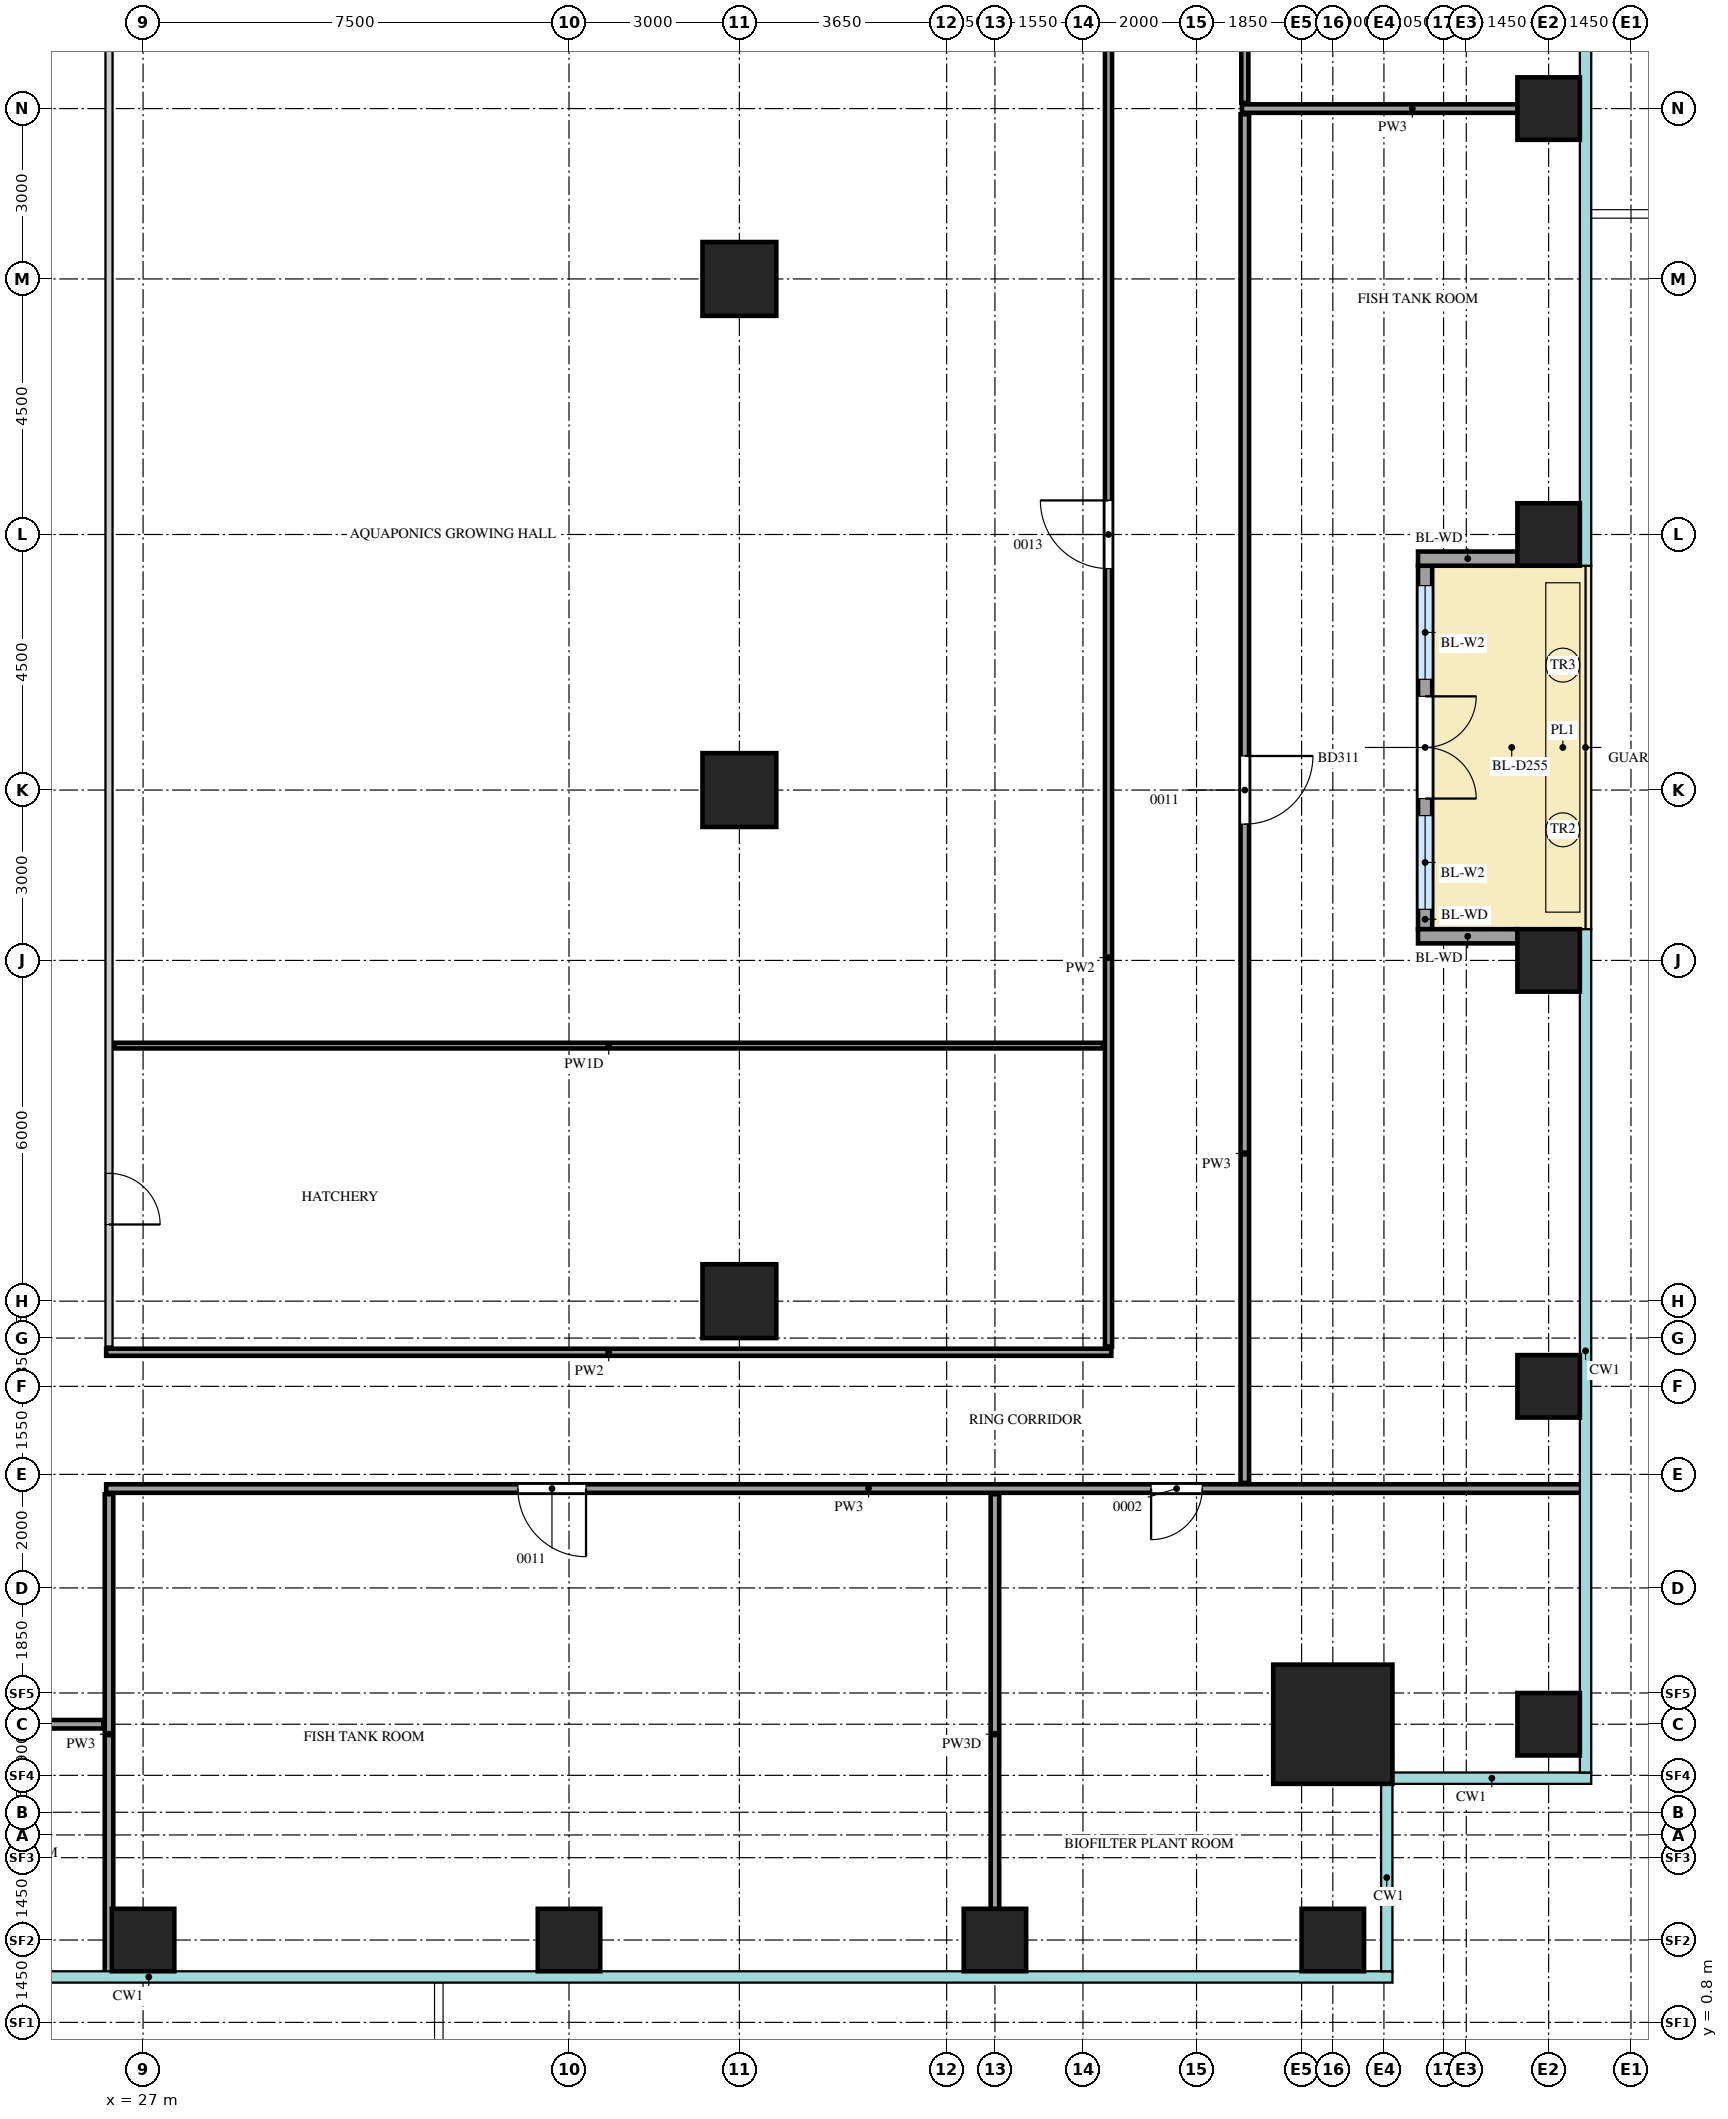
"""IFC4 building model, lengths in metres.
Left out: names, types, materials, properties, quantities, classifications, styles, units other than length and angle.
Written with IfcOpenShell. Run it as: python <this file> out.ifc"""

import sys

from ifc_helpers import new_model, si_unit, direction, frame, frame_2d, origin, origin_2d, place, context, subcontext, project, spatial, rectangle, extrude, source, transform, mapped, element, fill, save


model = new_model("IFC4")
c1 = context("Model", 3, precision=1e-05, world=origin(), true_north=direction((0.0, 1.0)))
c2 = subcontext(c1, "Body", "Model", "MODEL_VIEW")
j1 = project(units=[si_unit("LENGTHUNIT", "METRE"), si_unit("PLANEANGLEUNIT", "RADIAN")], contexts=[c1])
p1 = place(None, origin())
s1 = spatial("IfcSite", under=j1, at=p1, CompositionType="ELEMENT")
p2 = place(p1, origin())
s2 = spatial("IfcBuilding", under=s1, at=p2, CompositionType="ELEMENT")
p3 = place(p2, frame((0.0, 0.0, 145.5)))
s3 = spatial("IfcBuildingStorey", under=s2, at=p3, CompositionType="ELEMENT", Elevation=145.5)
m1 = source(origin(), c2, "Body", "SweptSolid", [
    extrude(rectangle(XDim=2.1, YDim=2.1, at=origin_2d()), origin(), (0.0, 0.0, 1.0), 4.4),
])
p4 = place(p3, frame((47.95, 6.05, 0.0), z_axis=(0.0, 0.0, 1.0), x_axis=(1.0, 0.0, 0.0)))
e1 = element("IfcColumn", 1, at=p4, inside=s3, PredefinedType="COLUMN", context=c2, shape_type="MappedRepresentation", body=[
    mapped(m1, transform((0.0, 0.0, 0.0))),
])
m2 = source(origin(), c2, "Body", "SweptSolid", [
    extrude(rectangle(XDim=1.1, YDim=1.1, at=origin_2d()), origin(), (0.0, 0.0, 1.0), 4.1),
])
for number, where, z_axis, x_axis in (
    (2, (27.0, 2.25, 0.0), (0.0, 0.0, 1.0), (1.0, 0.0, 0.0)),
    (3, (34.5, 2.25, 0.0), (0.0, 0.0, 1.0), (1.0, 0.0, 0.0)),
    (4, (42.0, 2.25, 0.0), (0.0, 0.0, 1.0), (1.0, 0.0, 0.0)),
    (5, (47.95, 2.25, 0.0), (0.0, 0.0, 1.0), (1.0, 0.0, 0.0)),
    (6, (51.75, 6.05, 0.0), (0.0, 0.0, 1.0), (1.0, 0.0, 0.0)),
    (7, (51.75, 12.0, 0.0), (0.0, 0.0, 1.0), (1.0, 0.0, 0.0)),
    (8, (51.75, 19.5, 0.0), (0.0, 0.0, 1.0), (1.0, 0.0, 0.0)),
    (9, (51.75, 27.0, 0.0), (0.0, 0.0, 1.0), (1.0, 0.0, 0.0)),
    (10, (51.75, 34.5, 0.0), (0.0, 0.0, 1.0), (1.0, 0.0, 0.0)),
):
    element("IfcColumn", number, at=place(p3, frame(where, z_axis=z_axis, x_axis=x_axis)), inside=s3, PredefinedType="COLUMN", context=c2, shape_type="MappedRepresentation", body=[
        mapped(m2, transform((0.0, 0.0, 0.0))),
    ])
m3 = source(origin(), c2, "Body", "SweptSolid", [
    extrude(rectangle(XDim=1.3, YDim=1.3, at=origin_2d()), origin(), (0.0, 0.0, 1.0), 4.1),
])
for number, where, z_axis, x_axis in (
    (11, (37.5, 13.5, 0.0), (0.0, 0.0, 1.0), (1.0, 0.0, 0.0)),
    (12, (37.5, 22.5, 0.0), (0.0, 0.0, 1.0), (1.0, 0.0, 0.0)),
    (13, (37.5, 31.5, 0.0), (0.0, 0.0, 1.0), (1.0, 0.0, 0.0)),
):
    element("IfcColumn", number, at=place(p3, frame(where, z_axis=z_axis, x_axis=x_axis)), inside=s3, PredefinedType="COLUMN", context=c2, shape_type="MappedRepresentation", body=[
        mapped(m3, transform((0.0, 0.0, 0.0))),
    ])
m4 = source(origin(), c2, "Body", "SweptSolid", [
    extrude(rectangle(XDim=6.4, YDim=0.25, at=frame_2d((3.2, 0.0))), origin(), (0.0, 0.0, 1.0), 3.55),
])
p5 = place(p3, frame((49.575, 20.05, 0.0), z_axis=(0.0, 0.0, 1.0), x_axis=(0.0, 1.0, 0.0)))
e14 = element("IfcWall", 14, at=p5, inside=s3, PredefinedType="SOLIDWALL", context=c2, shape_type="MappedRepresentation", body=[
    mapped(m4, transform((0.0, 0.0, 0.0))),
])
m5 = source(origin(), c2, "Body", "SweptSolid", [
    extrude(rectangle(XDim=1.65, YDim=2.4, at=frame_2d((0.825, 1.2))), frame((0.0, 0.135, 0.0), z_axis=(0.0, -1.0, 0.0), x_axis=(1.0, 0.0, 0.0)), (0.0, 0.0, 1.0), 0.27),
])
p6 = place(p5, frame((0.35, 0.0, 0.0)))
e15 = element("IfcOpeningElement", 15, at=p6, cuts=e14, PredefinedType="OPENING", context=c2, shape_type="MappedRepresentation", body=[
    mapped(m5, transform((0.0, 0.0, 0.0))),
])
p7 = place(p5, frame((4.4, 0.0, 0.0)))
e16 = element("IfcOpeningElement", 16, at=p7, cuts=e14, PredefinedType="OPENING", context=c2, shape_type="MappedRepresentation", body=[
    mapped(m5, transform((0.0, 0.0, 0.0))),
])
m6 = source(origin(), c2, "Body", "SweptSolid", [
    extrude(rectangle(XDim=1.8, YDim=2.4, at=frame_2d((0.9, 1.2))), frame((0.0, 0.135, 0.0), z_axis=(0.0, -1.0, 0.0), x_axis=(1.0, 0.0, 0.0)), (0.0, 0.0, 1.0), 0.27),
])
p8 = place(p5, frame((2.3, 0.0, 0.0)))
e17 = element("IfcOpeningElement", 17, at=p8, cuts=e14, PredefinedType="OPENING", context=c2, shape_type="MappedRepresentation", body=[
    mapped(m6, transform((0.0, 0.0, 0.0))),
])
m7 = source(origin(), c2, "Body", "SweptSolid", [
    extrude(rectangle(XDim=1.75, YDim=0.25, at=frame_2d((0.875, 0.0))), origin(), (0.0, 0.0, 1.0), 3.55),
])
for number, where, z_axis, x_axis in (
    (18, (51.2, 19.925, 0.0), (0.0, 0.0, 1.0), (-1.0, 0.0, 0.0)),
    (19, (51.2, 26.575, 0.0), (0.0, 0.0, 1.0), (-1.0, 0.0, 0.0)),
):
    element("IfcWall", number, at=place(p3, frame(where, z_axis=z_axis, x_axis=x_axis)), inside=s3, PredefinedType="SOLIDWALL", context=c2, shape_type="MappedRepresentation", body=[
        mapped(m7, transform((0.0, 0.0, 0.0))),
    ])
m8 = source(origin(), c2, "Body", "SweptSolid", [
    extrude(rectangle(XDim=8.45, YDim=0.15, at=frame_2d((4.225, 0.0))), origin(), (0.0, 0.0, 1.0), 4.2),
])
p9 = place(p3, frame((26.4, 1.65, 0.0), z_axis=(0.0, 0.0, 1.0), x_axis=(0.0, 1.0, 0.0)))
e20 = element("IfcWall", 20, at=p9, inside=s3, PredefinedType="PARTITIONING", context=c2, shape_type="MappedRepresentation", body=[
    mapped(m8, transform((0.0, 0.0, 0.0))),
])
m9 = source(origin(), c2, "Body", "SweptSolid", [
    extrude(rectangle(XDim=8.45, YDim=0.15, at=frame_2d((4.225, 0.0))), origin(), (0.0, 0.0, 1.0), 3.6),
])
p10 = place(p3, frame((42.0, 1.65, 0.0), z_axis=(0.0, 0.0, 1.0), x_axis=(0.0, 1.0, 0.0)))
e21 = element("IfcWall", 21, at=p10, inside=s3, PredefinedType="PARTITIONING", context=c2, shape_type="MappedRepresentation", body=[
    mapped(m9, transform((0.0, 0.0, 0.0))),
])
m10 = source(origin(), c2, "Body", "SweptSolid", [
    extrude(rectangle(XDim=14.35, YDim=0.15, at=frame_2d((7.175, 0.0))), origin(), (0.0, 0.0, 1.0), 4.2),
])
p11 = place(p3, frame((11.95, 6.05, 0.0), z_axis=(0.0, 0.0, 1.0), x_axis=(1.0, 0.0, 0.0)))
e22 = element("IfcWall", 22, at=p11, inside=s3, PredefinedType="PARTITIONING", context=c2, shape_type="MappedRepresentation", body=[
    mapped(m10, transform((0.0, 0.0, 0.0))),
])
m11 = source(origin(), c2, "Body", "SweptSolid", [
    extrude(rectangle(XDim=0.9, YDim=2.1, at=frame_2d((0.45, 1.05))), frame((0.0, 0.085, 0.0), z_axis=(0.0, -1.0, 0.0), x_axis=(1.0, 0.0, 0.0)), (0.0, 0.0, 1.0), 0.17),
])
p12 = place(p11, frame((6.8, 0.0, 0.0)))
e23 = element("IfcOpeningElement", 23, at=p12, cuts=e22, PredefinedType="OPENING", context=c2, shape_type="MappedRepresentation", body=[
    mapped(m11, transform((0.0, 0.0, 0.0))),
])
m12 = source(origin(), c2, "Body", "SweptSolid", [
    extrude(rectangle(XDim=26.0, YDim=0.15, at=frame_2d((13.0, 0.0))), origin(), (0.0, 0.0, 1.0), 4.2),
])
p13 = place(p3, frame((26.35, 10.2, 0.0), z_axis=(0.0, 0.0, 1.0), x_axis=(1.0, 0.0, 0.0)))
e24 = element("IfcWall", 24, at=p13, inside=s3, PredefinedType="PARTITIONING", context=c2, shape_type="MappedRepresentation", body=[
    mapped(m12, transform((0.0, 0.0, 0.0))),
])
m13 = source(origin(), c2, "Body", "SweptSolid", [
    extrude(rectangle(XDim=1.2, YDim=2.1, at=frame_2d((0.6, 1.05))), frame((0.0, 0.085, 0.0), z_axis=(0.0, -1.0, 0.0), x_axis=(1.0, 0.0, 0.0)), (0.0, 0.0, 1.0), 0.17),
])
p14 = place(p13, frame((7.25, 0.0, 0.0)))
e25 = element("IfcOpeningElement", 25, at=p14, cuts=e24, PredefinedType="OPENING", context=c2, shape_type="MappedRepresentation", body=[
    mapped(m13, transform((0.0, 0.0, 0.0))),
])
p15 = place(p13, frame((18.4, 0.0, 0.0)))
e26 = element("IfcOpeningElement", 26, at=p15, cuts=e24, PredefinedType="OPENING", context=c2, shape_type="MappedRepresentation", body=[
    mapped(m11, transform((0.0, 0.0, 0.0))),
])
m14 = source(origin(), c2, "Body", "SweptSolid", [
    extrude(rectangle(XDim=24.1, YDim=0.15, at=frame_2d((12.05, 0.0))), origin(), (0.0, 0.0, 1.0), 4.2),
])
p16 = place(p3, frame((46.4, 10.3, 0.0), z_axis=(0.0, 0.0, 1.0), x_axis=(0.0, 1.0, 0.0)))
e27 = element("IfcWall", 27, at=p16, inside=s3, PredefinedType="PARTITIONING", context=c2, shape_type="MappedRepresentation", body=[
    mapped(m14, transform((0.0, 0.0, 0.0))),
])
p17 = place(p16, frame((11.6, 0.0, 0.0)))
e28 = element("IfcOpeningElement", 28, at=p17, cuts=e27, PredefinedType="OPENING", context=c2, shape_type="MappedRepresentation", body=[
    mapped(m13, transform((0.0, 0.0, 0.0))),
])
m15 = source(origin(), c2, "Body", "SweptSolid", [
    extrude(rectangle(XDim=17.7, YDim=0.125, at=frame_2d((8.85, 0.0))), origin(), (0.0, 0.0, 1.0), 4.2),
])
p18 = place(p3, frame((26.35, 12.6, 0.0), z_axis=(0.0, 0.0, 1.0), x_axis=(1.0, 0.0, 0.0)))
e29 = element("IfcWall", 29, at=p18, inside=s3, PredefinedType="PARTITIONING", context=c2, shape_type="MappedRepresentation", body=[
    mapped(m15, transform((0.0, 0.0, 0.0))),
])
m16 = source(origin(), c2, "Body", "SweptSolid", [
    extrude(rectangle(XDim=23.2, YDim=0.125, at=frame_2d((11.6, 0.0))), origin(), (0.0, 0.0, 1.0), 4.2),
])
p19 = place(p3, frame((26.4, 12.7, 0.0), z_axis=(0.0, 0.0, 1.0), x_axis=(0.0, 1.0, 0.0)))
e30 = element("IfcWall", 30, at=p19, inside=s3, PredefinedType="PARTITIONING", context=c2, shape_type="MappedRepresentation", body=[
    mapped(m16, transform((0.0, 0.0, 0.0))),
])
m17 = source(origin(), c2, "Body", "SweptSolid", [
    extrude(rectangle(XDim=0.9, YDim=2.1, at=frame_2d((0.45, 1.05))), frame((0.0, 0.073, 0.0), z_axis=(0.0, -1.0, 0.0), x_axis=(1.0, 0.0, 0.0)), (0.0, 0.0, 1.0), 0.145),
])
p20 = place(p19, frame((2.15, 0.0, 0.0)))
e31 = element("IfcOpeningElement", 31, at=p20, cuts=e30, PredefinedType="OPENING", context=c2, shape_type="MappedRepresentation", body=[
    mapped(m17, transform((0.0, 0.0, 0.0))),
])
m18 = source(origin(), c2, "Body", "SweptSolid", [
    extrude(rectangle(XDim=32.85, YDim=0.125, at=frame_2d((16.425, 0.0))), origin(), (0.0, 0.0, 1.0), 4.2),
])
p21 = place(p3, frame((44.0, 12.7, 0.0), z_axis=(0.0, 0.0, 1.0), x_axis=(0.0, 1.0, 0.0)))
e32 = element("IfcWall", 32, at=p21, inside=s3, PredefinedType="PARTITIONING", context=c2, shape_type="MappedRepresentation", body=[
    mapped(m18, transform((0.0, 0.0, 0.0))),
])
m19 = source(origin(), c2, "Body", "SweptSolid", [
    extrude(rectangle(XDim=1.2, YDim=2.1, at=frame_2d((0.6, 1.05))), frame((0.0, 0.073, 0.0), z_axis=(0.0, -1.0, 0.0), x_axis=(1.0, 0.0, 0.0)), (0.0, 0.0, 1.0), 0.145),
])
p22 = place(p21, frame((13.7, 0.0, 0.0)))
e33 = element("IfcOpeningElement", 33, at=p22, cuts=e32, PredefinedType="OPENING", context=c2, shape_type="MappedRepresentation", body=[
    mapped(m19, transform((0.0, 0.0, 0.0))),
])
p23 = place(p21, frame((27.5, 0.0, 0.0)))
e34 = element("IfcOpeningElement", 34, at=p23, cuts=e32, PredefinedType="OPENING", context=c2, shape_type="MappedRepresentation", body=[
    mapped(m19, transform((0.0, 0.0, 0.0))),
])
m20 = source(origin(), c2, "Body", "SweptSolid", [
    extrude(rectangle(XDim=17.4, YDim=0.1, at=frame_2d((8.7, 0.0))), origin(), (0.0, 0.0, 1.0), 4.2),
])
p24 = place(p3, frame((26.5, 18.0, 0.0), z_axis=(0.0, 0.0, 1.0), x_axis=(1.0, 0.0, 0.0)))
e35 = element("IfcWall", 35, at=p24, inside=s3, PredefinedType="PARTITIONING", context=c2, shape_type="MappedRepresentation", body=[
    mapped(m20, transform((0.0, 0.0, 0.0))),
])
m21 = source(origin(), c2, "Body", "SweptSolid", [
    extrude(rectangle(XDim=6.0, YDim=0.15, at=frame_2d((3.0, 0.0))), origin(), (0.0, 0.0, 1.0), 4.2),
])
p25 = place(p3, frame((46.35, 34.5, 0.0), z_axis=(0.0, 0.0, 1.0), x_axis=(1.0, 0.0, 0.0)))
e36 = element("IfcWall", 36, at=p25, inside=s3, PredefinedType="PARTITIONING", context=c2, shape_type="MappedRepresentation", body=[
    mapped(m21, transform((0.0, 0.0, 0.0))),
])
m22 = source(origin(), c2, "Body", "SweptSolid", [
    extrude(rectangle(XDim=13.35, YDim=0.125, at=frame_2d((6.675, 0.0))), origin(), (0.0, 0.0, 1.0), 4.2),
])
p26 = place(p3, frame((46.4, 34.6, 0.0), z_axis=(0.0, 0.0, 1.0), x_axis=(0.0, 1.0, 0.0)))
e37 = element("IfcWall", 37, at=p26, inside=s3, PredefinedType="PARTITIONING", context=c2, shape_type="MappedRepresentation", body=[
    mapped(m22, transform((0.0, 0.0, 0.0))),
])
p27 = place(p26, frame((4.9, 0.0, 0.0)))
e38 = element("IfcOpeningElement", 38, at=p27, cuts=e37, PredefinedType="OPENING", context=c2, shape_type="MappedRepresentation", body=[
    mapped(m19, transform((0.0, 0.0, 0.0))),
])
m23 = source(origin(), c2, "Body", "SweptSolid", [
    extrude(rectangle(XDim=1.65, YDim=2.4, at=frame_2d((0.825, 1.2))), frame((0.0, 0.03, 0.0), z_axis=(0.0, -1.0, 0.0), x_axis=(1.0, 0.0, 0.0)), (0.0, 0.0, 1.0), 0.06),
])
p28 = place(p6, origin())
e39 = element("IfcWindow", 39, at=p28, inside=s3, PartitioningType="SINGLE_PANEL", PredefinedType="WINDOW", context=c2, shape_type="MappedRepresentation", body=[
    mapped(m23, transform((0.0, 0.0, 0.0))),
])
fill(e15, e39)
p29 = place(p7, origin())
e40 = element("IfcWindow", 40, at=p29, inside=s3, PartitioningType="SINGLE_PANEL", PredefinedType="WINDOW", context=c2, shape_type="MappedRepresentation", body=[
    mapped(m23, transform((0.0, 0.0, 0.0))),
])
fill(e16, e40)
m24 = source(origin(), c2, "Body", "SweptSolid", [
    extrude(rectangle(XDim=1.8, YDim=2.4, at=frame_2d((0.9, 1.2))), frame((0.0, 0.025, 0.0), z_axis=(0.0, -1.0, 0.0), x_axis=(1.0, 0.0, 0.0)), (0.0, 0.0, 1.0), 0.05),
])
p30 = place(p8, origin())
e41 = element("IfcDoor", 41, at=p30, inside=s3, OperationType="DOUBLE_DOOR_DOUBLE_SWING", PredefinedType="DOOR", context=c2, shape_type="MappedRepresentation", body=[
    mapped(m24, transform((0.0, 0.0, 0.0))),
])
fill(e17, e41)
m25 = source(origin(), c2, "Body", "SweptSolid", [
    extrude(rectangle(XDim=1.2, YDim=2.1, at=frame_2d((0.6, 1.05))), frame((0.0, 0.025, 0.0), z_axis=(0.0, -1.0, 0.0), x_axis=(1.0, 0.0, 0.0)), (0.0, 0.0, 1.0), 0.05),
])
p31 = place(p14, origin())
e42 = element("IfcDoor", 42, at=p31, inside=s3, OperationType="SINGLE_SWING_RIGHT", PredefinedType="DOOR", context=c2, shape_type="MappedRepresentation", body=[
    mapped(m25, transform((0.0, 0.0, 0.0))),
])
fill(e25, e42)
m26 = source(origin(), c2, "Body", "SweptSolid", [
    extrude(rectangle(XDim=0.9, YDim=2.1, at=frame_2d((0.45, 1.05))), frame((0.0, 0.025, 0.0), z_axis=(0.0, -1.0, 0.0), x_axis=(1.0, 0.0, 0.0)), (0.0, 0.0, 1.0), 0.05),
])
p32 = place(p15, origin())
e43 = element("IfcDoor", 43, at=p32, inside=s3, OperationType="SINGLE_SWING_LEFT", PredefinedType="DOOR", context=c2, shape_type="MappedRepresentation", body=[
    mapped(m26, transform((0.0, 0.0, 0.0))),
])
fill(e26, e43)
p33 = place(p20, origin())
e44 = element("IfcDoor", 44, at=p33, inside=s3, OperationType="SINGLE_SWING_LEFT", PredefinedType="DOOR", context=c2, shape_type="MappedRepresentation", body=[
    mapped(m26, transform((0.0, 0.0, 0.0))),
])
fill(e31, e44)
p34 = place(p22, origin())
e45 = element("IfcDoor", 45, at=p34, inside=s3, OperationType="SINGLE_SWING_LEFT", PredefinedType="DOOR", context=c2, shape_type="MappedRepresentation", body=[
    mapped(m25, transform((0.0, 0.0, 0.0))),
])
fill(e33, e45)
p35 = place(p17, origin())
e46 = element("IfcDoor", 46, at=p35, inside=s3, OperationType="SINGLE_SWING_RIGHT", PredefinedType="DOOR", context=c2, shape_type="MappedRepresentation", body=[
    mapped(m25, transform((0.0, 0.0, 0.0))),
])
fill(e28, e46)
save(model, sys.argv[1])
